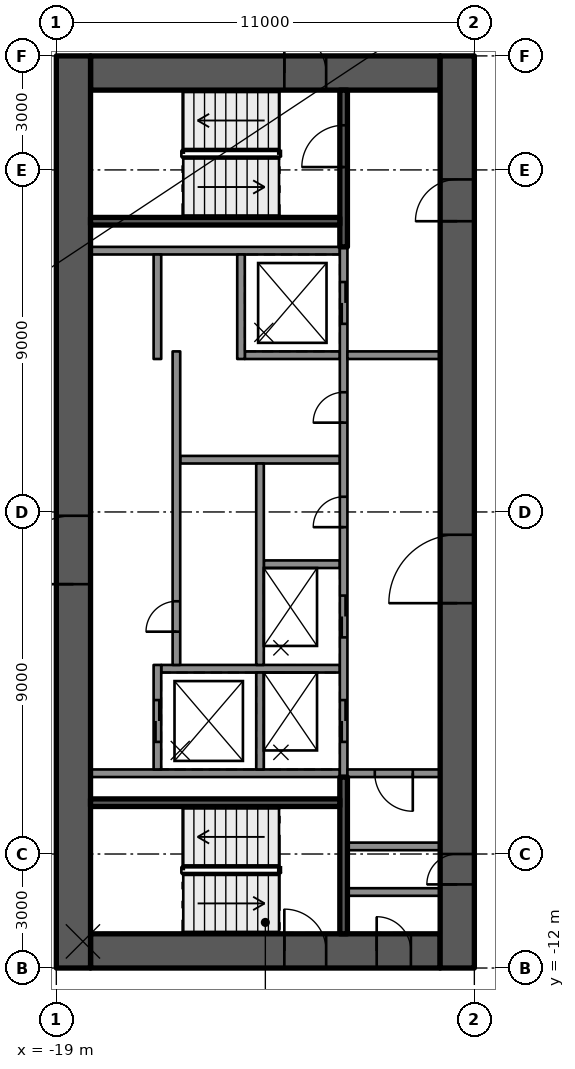
"""IFC4 building model, lengths in metres.
Left out: names, types, materials, properties, quantities, classifications, styles, units other than length and angle.
Written with IfcOpenShell. Run it as: python <this file> out.ifc"""

import sys

from ifc_helpers import new_model, si_unit, direction, frame, frame_2d, origin, place, context, subcontext, project, spatial, rectangle, extrude, element, fill, save


model = new_model("IFC4")
c1 = context("Model", 3, precision=1e-05, world=origin(), true_north=direction((0.0, 1.0)))
c2 = subcontext(c1, "Body", "Model", "MODEL_VIEW")
j1 = project(units=[si_unit("LENGTHUNIT", "METRE"), si_unit("PLANEANGLEUNIT", "RADIAN")], contexts=[c1])
p1 = place(None, origin())
s1 = spatial("IfcSite", under=j1, at=p1, CompositionType="ELEMENT")
p2 = place(p1, origin())
s2 = spatial("IfcBuilding", under=s1, at=p2, CompositionType="ELEMENT")
p3 = place(p2, frame((0.0, 0.0, 214.0)))
s3 = spatial("IfcBuildingStorey", under=s2, at=p3, CompositionType="ELEMENT", Elevation=214.0)
p4 = place(p3, frame((-18.1, 11.55, 0.0), z_axis=(0.0, 0.0, 1.0), x_axis=(1.0, 0.0, 0.0)))
e1 = element("IfcWall", 1, at=p4, inside=s3, PredefinedType="SHEAR", context=c2, shape_type="SweptSolid", body=[
    extrude(rectangle(XDim=9.2, YDim=0.9, at=frame_2d((4.6, 0.0))), origin(), (0.0, 0.0, 1.0), 3.5),
])
p5 = place(p4, frame((5.1, 0.0, 0.0)))
e2 = element("IfcOpeningElement", 2, at=p5, cuts=e1, PredefinedType="OPENING", context=c2, shape_type="SweptSolid", body=[
    extrude(rectangle(XDim=1.1, YDim=2.1, at=frame_2d((0.55, 1.05))), frame((0.0, 0.46, 0.0), z_axis=(0.0, -1.0, 0.0), x_axis=(1.0, 0.0, 0.0)), (0.0, 0.0, 1.0), 0.92),
])
p6 = place(p3, frame((-18.1, -11.55, 0.0), z_axis=(0.0, 0.0, 1.0), x_axis=(1.0, 0.0, 0.0)))
e3 = element("IfcWall", 3, at=p6, inside=s3, PredefinedType="SHEAR", context=c2, shape_type="SweptSolid", body=[
    extrude(rectangle(XDim=9.2, YDim=0.9, at=frame_2d((4.6, 0.0))), origin(), (0.0, 0.0, 1.0), 3.5),
])
p7 = place(p6, frame((5.1, 0.0, 0.0)))
e4 = element("IfcOpeningElement", 4, at=p7, cuts=e3, PredefinedType="OPENING", context=c2, shape_type="SweptSolid", body=[
    extrude(rectangle(XDim=1.1, YDim=2.1, at=frame_2d((0.55, 1.05))), frame((0.0, 0.46, 0.0), z_axis=(0.0, -1.0, 0.0), x_axis=(1.0, 0.0, 0.0)), (0.0, 0.0, 1.0), 0.92),
])
p8 = place(p6, frame((7.53, 0.0, 0.0)))
e5 = element("IfcOpeningElement", 5, at=p8, cuts=e3, PredefinedType="OPENING", context=c2, shape_type="SweptSolid", body=[
    extrude(rectangle(XDim=0.9, YDim=2.1, at=frame_2d((0.45, 1.05))), frame((0.0, 0.46, 0.0), z_axis=(0.0, -1.0, 0.0), x_axis=(1.0, 0.0, 0.0)), (0.0, 0.0, 1.0), 0.92),
])
p9 = place(p3, frame((-18.55, -12.0, 0.0), z_axis=(0.0, 0.0, 1.0), x_axis=(0.0, 1.0, 0.0)))
e6 = element("IfcWall", 6, at=p9, inside=s3, PredefinedType="SHEAR", context=c2, shape_type="SweptSolid", body=[
    extrude(rectangle(XDim=24.0, YDim=0.9, at=frame_2d((12.0, 0.0))), origin(), (0.0, 0.0, 1.0), 3.5),
])
p10 = place(p9, frame((10.1, 0.0, 0.0)))
e7 = element("IfcOpeningElement", 7, at=p10, cuts=e6, PredefinedType="OPENING", context=c2, shape_type="SweptSolid", body=[
    extrude(rectangle(XDim=1.8, YDim=2.1, at=frame_2d((0.9, 1.05))), frame((0.0, 0.46, 0.0), z_axis=(0.0, -1.0, 0.0), x_axis=(1.0, 0.0, 0.0)), (0.0, 0.0, 1.0), 0.92),
])
p11 = place(p3, frame((-8.45, -12.0, 0.0), z_axis=(0.0, 0.0, 1.0), x_axis=(0.0, 1.0, 0.0)))
e8 = element("IfcWall", 8, at=p11, inside=s3, PredefinedType="SHEAR", context=c2, shape_type="SweptSolid", body=[
    extrude(rectangle(XDim=24.0, YDim=0.9, at=frame_2d((12.0, 0.0))), origin(), (0.0, 0.0, 1.0), 3.5),
])
p12 = place(p11, frame((9.6, 0.0, 0.0)))
e9 = element("IfcOpeningElement", 9, at=p12, cuts=e8, PredefinedType="OPENING", context=c2, shape_type="SweptSolid", body=[
    extrude(rectangle(XDim=1.8, YDim=2.1, at=frame_2d((0.9, 1.05))), frame((0.0, 0.46, 0.0), z_axis=(0.0, -1.0, 0.0), x_axis=(1.0, 0.0, 0.0)), (0.0, 0.0, 1.0), 0.92),
])
p13 = place(p11, frame((19.65, 0.0, 0.0)))
e10 = element("IfcOpeningElement", 10, at=p13, cuts=e8, PredefinedType="OPENING", context=c2, shape_type="SweptSolid", body=[
    extrude(rectangle(XDim=1.1, YDim=2.1, at=frame_2d((0.55, 1.05))), frame((0.0, 0.46, 0.0), z_axis=(0.0, -1.0, 0.0), x_axis=(1.0, 0.0, 0.0)), (0.0, 0.0, 1.0), 0.92),
])
p14 = place(p11, frame((2.2, 0.0, 0.0)))
e11 = element("IfcOpeningElement", 11, at=p14, cuts=e8, PredefinedType="OPENING", context=c2, shape_type="SweptSolid", body=[
    extrude(rectangle(XDim=0.8, YDim=2.1, at=frame_2d((0.4, 1.05))), frame((0.0, 0.46, 0.0), z_axis=(0.0, -1.0, 0.0), x_axis=(1.0, 0.0, 0.0)), (0.0, 0.0, 1.0), 0.92),
])
for number, where, z_axis, x_axis in (
    (12, (-11.54, 6.875, 0.0), (0.0, 0.0, 1.0), (-1.0, 0.0, 0.0)),
    (13, (-11.54, -6.875, 0.0), (0.0, 0.0, 1.0), (-1.0, 0.0, 0.0)),
):
    element("IfcWall", number, at=place(p3, frame(where, z_axis=z_axis, x_axis=x_axis)), inside=s3, PredefinedType="SOLIDWALL", context=c2, shape_type="SweptSolid", body=[
        extrude(rectangle(XDim=6.56, YDim=0.2, at=frame_2d((3.28, 0.0))), origin(), (0.0, 0.0, 1.0), 3.08),
    ])
p15 = place(p3, frame((-11.54, -4.125, 0.0), z_axis=(0.0, 0.0, 1.0), x_axis=(-1.0, 0.0, 0.0)))
e14 = element("IfcWall", 14, at=p15, inside=s3, PredefinedType="SOLIDWALL", context=c2, shape_type="SweptSolid", body=[
    extrude(rectangle(XDim=4.7, YDim=0.2, at=frame_2d((2.35, 0.0))), origin(), (0.0, 0.0, 1.0), 3.08),
])
p16 = place(p3, frame((-11.54, -1.375, 0.0), z_axis=(0.0, 0.0, 1.0), x_axis=(-1.0, 0.0, 0.0)))
e15 = element("IfcWall", 15, at=p16, inside=s3, PredefinedType="SOLIDWALL", context=c2, shape_type="SweptSolid", body=[
    extrude(rectangle(XDim=2.0, YDim=0.2, at=frame_2d((1.0, 0.0))), origin(), (0.0, 0.0, 1.0), 3.08),
])
p17 = place(p3, frame((-11.54, 1.375, 0.0), z_axis=(0.0, 0.0, 1.0), x_axis=(-1.0, 0.0, 0.0)))
e16 = element("IfcWall", 16, at=p17, inside=s3, PredefinedType="SOLIDWALL", context=c2, shape_type="SweptSolid", body=[
    extrude(rectangle(XDim=4.2, YDim=0.2, at=frame_2d((2.1, 0.0))), origin(), (0.0, 0.0, 1.0), 3.08),
])
p18 = place(p3, frame((-11.54, 4.125, 0.0), z_axis=(0.0, 0.0, 1.0), x_axis=(-1.0, 0.0, 0.0)))
e17 = element("IfcWall", 17, at=p18, inside=s3, PredefinedType="SOLIDWALL", context=c2, shape_type="SweptSolid", body=[
    extrude(rectangle(XDim=2.5, YDim=0.2, at=frame_2d((1.25, 0.0))), origin(), (0.0, 0.0, 1.0), 3.08),
])
p19 = place(p3, frame((-11.44, -6.975, 0.0), z_axis=(0.0, 0.0, 1.0), x_axis=(0.0, 1.0, 0.0)))
e18 = element("IfcWall", 18, at=p19, inside=s3, PredefinedType="SOLIDWALL", context=c2, shape_type="SweptSolid", body=[
    extrude(rectangle(XDim=13.95, YDim=0.2, at=frame_2d((6.975, 0.0))), origin(), (0.0, 0.0, 1.0), 3.08),
])
p20 = place(p19, frame((0.925, 0.0, 0.0)))
e19 = element("IfcOpeningElement", 19, at=p20, cuts=e18, PredefinedType="OPENING", context=c2, shape_type="SweptSolid", body=[
    extrude(rectangle(XDim=1.1, YDim=2.1, at=frame_2d((0.55, 1.05))), frame((0.0, 0.11, 0.0), z_axis=(0.0, -1.0, 0.0), x_axis=(1.0, 0.0, 0.0)), (0.0, 0.0, 1.0), 0.22),
])
p21 = place(p19, frame((3.675, 0.0, 0.0)))
e20 = element("IfcOpeningElement", 20, at=p21, cuts=e18, PredefinedType="OPENING", context=c2, shape_type="SweptSolid", body=[
    extrude(rectangle(XDim=1.1, YDim=2.1, at=frame_2d((0.55, 1.05))), frame((0.0, 0.11, 0.0), z_axis=(0.0, -1.0, 0.0), x_axis=(1.0, 0.0, 0.0)), (0.0, 0.0, 1.0), 0.22),
])
p22 = place(p19, frame((11.925, 0.0, 0.0)))
e21 = element("IfcOpeningElement", 21, at=p22, cuts=e18, PredefinedType="OPENING", context=c2, shape_type="SweptSolid", body=[
    extrude(rectangle(XDim=1.1, YDim=2.1, at=frame_2d((0.55, 1.05))), frame((0.0, 0.11, 0.0), z_axis=(0.0, -1.0, 0.0), x_axis=(1.0, 0.0, 0.0)), (0.0, 0.0, 1.0), 0.22),
])
p23 = place(p19, frame((6.575, 0.0, 0.0)))
e22 = element("IfcOpeningElement", 22, at=p23, cuts=e18, PredefinedType="OPENING", context=c2, shape_type="SweptSolid", body=[
    extrude(rectangle(XDim=0.8, YDim=2.1, at=frame_2d((0.4, 1.05))), frame((0.0, 0.11, 0.0), z_axis=(0.0, -1.0, 0.0), x_axis=(1.0, 0.0, 0.0)), (0.0, 0.0, 1.0), 0.22),
])
p24 = place(p19, frame((9.325, 0.0, 0.0)))
e23 = element("IfcOpeningElement", 23, at=p24, cuts=e18, PredefinedType="OPENING", context=c2, shape_type="SweptSolid", body=[
    extrude(rectangle(XDim=0.8, YDim=2.1, at=frame_2d((0.4, 1.05))), frame((0.0, 0.11, 0.0), z_axis=(0.0, -1.0, 0.0), x_axis=(1.0, 0.0, 0.0)), (0.0, 0.0, 1.0), 0.22),
])
p25 = place(p3, frame((-13.64, -6.775, 0.0), z_axis=(0.0, 0.0, 1.0), x_axis=(0.0, 1.0, 0.0)))
e24 = element("IfcWall", 24, at=p25, inside=s3, PredefinedType="SOLIDWALL", context=c2, shape_type="SweptSolid", body=[
    extrude(rectangle(XDim=2.55, YDim=0.2, at=frame_2d((1.275, 0.0))), origin(), (0.0, 0.0, 1.0), 3.08),
])
p26 = place(p3, frame((-13.64, -4.025, 0.0), z_axis=(0.0, 0.0, 1.0), x_axis=(0.0, 1.0, 0.0)))
e25 = element("IfcWall", 25, at=p26, inside=s3, PredefinedType="SOLIDWALL", context=c2, shape_type="SweptSolid", body=[
    extrude(rectangle(XDim=5.3, YDim=0.2, at=frame_2d((2.65, 0.0))), origin(), (0.0, 0.0, 1.0), 3.08),
])
p27 = place(p3, frame((-14.14, 4.025, 0.0), z_axis=(0.0, 0.0, 1.0), x_axis=(0.0, 1.0, 0.0)))
e26 = element("IfcWall", 26, at=p27, inside=s3, PredefinedType="SOLIDWALL", context=c2, shape_type="SweptSolid", body=[
    extrude(rectangle(XDim=2.75, YDim=0.2, at=frame_2d((1.375, 0.0))), origin(), (0.0, 0.0, 1.0), 3.08),
])
p28 = place(p3, frame((-16.34, -6.775, 0.0), z_axis=(0.0, 0.0, 1.0), x_axis=(0.0, 1.0, 0.0)))
e27 = element("IfcWall", 27, at=p28, inside=s3, PredefinedType="SOLIDWALL", context=c2, shape_type="SweptSolid", body=[
    extrude(rectangle(XDim=2.75, YDim=0.2, at=frame_2d((1.375, 0.0))), origin(), (0.0, 0.0, 1.0), 3.08),
])
p29 = place(p28, frame((0.725, 0.0, 0.0)))
e28 = element("IfcOpeningElement", 28, at=p29, cuts=e27, PredefinedType="OPENING", context=c2, shape_type="SweptSolid", body=[
    extrude(rectangle(XDim=1.1, YDim=2.1, at=frame_2d((0.55, 1.05))), frame((0.0, 0.11, 0.0), z_axis=(0.0, -1.0, 0.0), x_axis=(1.0, 0.0, 0.0)), (0.0, 0.0, 1.0), 0.22),
])
p30 = place(p3, frame((-15.84, -4.025, 0.0), z_axis=(0.0, 0.0, 1.0), x_axis=(0.0, 1.0, 0.0)))
e29 = element("IfcWall", 29, at=p30, inside=s3, PredefinedType="SOLIDWALL", context=c2, shape_type="SweptSolid", body=[
    extrude(rectangle(XDim=8.25, YDim=0.2, at=frame_2d((4.125, 0.0))), origin(), (0.0, 0.0, 1.0), 3.08),
])
p31 = place(p30, frame((0.875, 0.0, 0.0)))
e30 = element("IfcOpeningElement", 30, at=p31, cuts=e29, PredefinedType="OPENING", context=c2, shape_type="SweptSolid", body=[
    extrude(rectangle(XDim=0.8, YDim=2.1, at=frame_2d((0.4, 1.05))), frame((0.0, 0.11, 0.0), z_axis=(0.0, -1.0, 0.0), x_axis=(1.0, 0.0, 0.0)), (0.0, 0.0, 1.0), 0.22),
])
p32 = place(p3, frame((-16.34, 4.025, 0.0), z_axis=(0.0, 0.0, 1.0), x_axis=(0.0, 1.0, 0.0)))
e31 = element("IfcWall", 31, at=p32, inside=s3, PredefinedType="SOLIDWALL", context=c2, shape_type="SweptSolid", body=[
    extrude(rectangle(XDim=2.75, YDim=0.2, at=frame_2d((1.375, 0.0))), origin(), (0.0, 0.0, 1.0), 3.08),
])
p33 = place(p3, frame((-11.44, 6.975, 0.0), z_axis=(0.0, 0.0, 1.0), x_axis=(0.0, 1.0, 0.0)))
e32 = element("IfcWall", 32, at=p33, inside=s3, PredefinedType="SOLIDWALL", context=c2, shape_type="SweptSolid", body=[
    extrude(rectangle(XDim=4.125, YDim=0.2, at=frame_2d((2.062, 0.0))), origin(), (0.0, 0.0, 1.0), 3.08),
])
p34 = place(p33, frame((2.1, 0.0, 0.0)))
e33 = element("IfcOpeningElement", 33, at=p34, cuts=e32, PredefinedType="OPENING", context=c2, shape_type="SweptSolid", body=[
    extrude(rectangle(XDim=1.1, YDim=2.1, at=frame_2d((0.55, 1.05))), frame((0.0, 0.11, 0.0), z_axis=(0.0, -1.0, 0.0), x_axis=(1.0, 0.0, 0.0)), (0.0, 0.0, 1.0), 0.22),
])
p35 = place(p3, frame((-11.54, 7.65, 0.0), z_axis=(0.0, 0.0, 1.0), x_axis=(-1.0, 0.0, 0.0)))
e34 = element("IfcWall", 34, at=p35, inside=s3, PredefinedType="SOLIDWALL", context=c2, shape_type="SweptSolid", body=[
    extrude(rectangle(XDim=6.56, YDim=0.2, at=frame_2d((3.28, 0.0))), origin(), (0.0, 0.0, 1.0), 3.08),
])
p36 = place(p3, frame((-11.44, -11.1, 0.0), z_axis=(0.0, 0.0, 1.0), x_axis=(0.0, 1.0, 0.0)))
e35 = element("IfcWall", 35, at=p36, inside=s3, PredefinedType="SOLIDWALL", context=c2, shape_type="SweptSolid", body=[
    extrude(rectangle(XDim=4.125, YDim=0.2, at=frame_2d((2.062, 0.0))), origin(), (0.0, 0.0, 1.0), 3.08),
])
p37 = place(p3, frame((-11.54, -7.65, 0.0), z_axis=(0.0, 0.0, 1.0), x_axis=(-1.0, 0.0, 0.0)))
e36 = element("IfcWall", 36, at=p37, inside=s3, PredefinedType="SOLIDWALL", context=c2, shape_type="SweptSolid", body=[
    extrude(rectangle(XDim=6.56, YDim=0.2, at=frame_2d((3.28, 0.0))), origin(), (0.0, 0.0, 1.0), 3.08),
])
p38 = place(p3, frame((-8.9, 4.125, 0.0), z_axis=(0.0, 0.0, 1.0), x_axis=(-1.0, 0.0, 0.0)))
e37 = element("IfcWall", 37, at=p38, inside=s3, PredefinedType="PARTITIONING", context=c2, shape_type="SweptSolid", body=[
    extrude(rectangle(XDim=2.44, YDim=0.2, at=frame_2d((1.22, 0.0))), origin(), (0.0, 0.0, 1.0), 3.08),
])
p39 = place(p3, frame((-8.9, -6.875, 0.0), z_axis=(0.0, 0.0, 1.0), x_axis=(-1.0, 0.0, 0.0)))
e38 = element("IfcWall", 38, at=p39, inside=s3, PredefinedType="PARTITIONING", context=c2, shape_type="SweptSolid", body=[
    extrude(rectangle(XDim=2.44, YDim=0.2, at=frame_2d((1.22, 0.0))), origin(), (0.0, 0.0, 1.0), 3.08),
])
p40 = place(p39, frame((0.72, 0.0, 0.0)))
e39 = element("IfcOpeningElement", 39, at=p40, cuts=e38, PredefinedType="OPENING", context=c2, shape_type="SweptSolid", body=[
    extrude(rectangle(XDim=1.0, YDim=2.1, at=frame_2d((0.5, 1.05))), frame((0.0, 0.11, 0.0), z_axis=(0.0, -1.0, 0.0), x_axis=(1.0, 0.0, 0.0)), (0.0, 0.0, 1.0), 0.22),
])
for number, where, z_axis, x_axis in (
    (40, (-8.9, -10.0, 0.0), (0.0, 0.0, 1.0), (-1.0, 0.0, 0.0)),
    (41, (-8.9, -8.8, 0.0), (0.0, 0.0, 1.0), (-1.0, 0.0, 0.0)),
):
    element("IfcWall", number, at=place(p3, frame(where, z_axis=z_axis, x_axis=x_axis)), inside=s3, PredefinedType="PARTITIONING", context=c2, shape_type="SweptSolid", body=[
        extrude(rectangle(XDim=2.44, YDim=0.2, at=frame_2d((1.22, 0.0))), origin(), (0.0, 0.0, 1.0), 3.08),
    ])
p41 = place(p20, origin())
e42 = element("IfcDoor", 42, at=p41, inside=s3, OperationType="DOUBLE_DOOR_SLIDING", PredefinedType="DOOR", context=c2, shape_type="SweptSolid", body=[
    extrude(rectangle(XDim=1.1, YDim=2.1, at=frame_2d((0.55, 1.05))), frame((0.0, 0.025, 0.0), z_axis=(0.0, -1.0, 0.0), x_axis=(1.0, 0.0, 0.0)), (0.0, 0.0, 1.0), 0.05),
])
fill(e19, e42)
p42 = place(p29, origin())
e43 = element("IfcDoor", 43, at=p42, inside=s3, OperationType="DOUBLE_DOOR_SLIDING", PredefinedType="DOOR", context=c2, shape_type="SweptSolid", body=[
    extrude(rectangle(XDim=1.1, YDim=2.1, at=frame_2d((0.55, 1.05))), frame((0.0, 0.025, 0.0), z_axis=(0.0, -1.0, 0.0), x_axis=(1.0, 0.0, 0.0)), (0.0, 0.0, 1.0), 0.05),
])
fill(e28, e43)
p43 = place(p21, origin())
e44 = element("IfcDoor", 44, at=p43, inside=s3, OperationType="DOUBLE_DOOR_SLIDING", PredefinedType="DOOR", context=c2, shape_type="SweptSolid", body=[
    extrude(rectangle(XDim=1.1, YDim=2.1, at=frame_2d((0.55, 1.05))), frame((0.0, 0.025, 0.0), z_axis=(0.0, -1.0, 0.0), x_axis=(1.0, 0.0, 0.0)), (0.0, 0.0, 1.0), 0.05),
])
fill(e20, e44)
p44 = place(p22, origin())
e45 = element("IfcDoor", 45, at=p44, inside=s3, OperationType="DOUBLE_DOOR_SLIDING", PredefinedType="DOOR", context=c2, shape_type="SweptSolid", body=[
    extrude(rectangle(XDim=1.1, YDim=2.1, at=frame_2d((0.55, 1.05))), frame((0.0, 0.025, 0.0), z_axis=(0.0, -1.0, 0.0), x_axis=(1.0, 0.0, 0.0)), (0.0, 0.0, 1.0), 0.05),
])
fill(e21, e45)
p45 = place(p31, origin())
e46 = element("IfcDoor", 46, at=p45, inside=s3, OperationType="SINGLE_SWING_LEFT", PredefinedType="DOOR", context=c2, shape_type="SweptSolid", body=[
    extrude(rectangle(XDim=0.8, YDim=2.1, at=frame_2d((0.4, 1.05))), frame((0.0, 0.025, 0.0), z_axis=(0.0, -1.0, 0.0), x_axis=(1.0, 0.0, 0.0)), (0.0, 0.0, 1.0), 0.05),
])
fill(e30, e46)
p46 = place(p23, origin())
e47 = element("IfcDoor", 47, at=p46, inside=s3, OperationType="SINGLE_SWING_LEFT", PredefinedType="DOOR", context=c2, shape_type="SweptSolid", body=[
    extrude(rectangle(XDim=0.8, YDim=2.1, at=frame_2d((0.4, 1.05))), frame((0.0, 0.025, 0.0), z_axis=(0.0, -1.0, 0.0), x_axis=(1.0, 0.0, 0.0)), (0.0, 0.0, 1.0), 0.05),
])
fill(e22, e47)
p47 = place(p24, origin())
e48 = element("IfcDoor", 48, at=p47, inside=s3, OperationType="SINGLE_SWING_LEFT", PredefinedType="DOOR", context=c2, shape_type="SweptSolid", body=[
    extrude(rectangle(XDim=0.8, YDim=2.1, at=frame_2d((0.4, 1.05))), frame((0.0, 0.025, 0.0), z_axis=(0.0, -1.0, 0.0), x_axis=(1.0, 0.0, 0.0)), (0.0, 0.0, 1.0), 0.05),
])
fill(e23, e48)
p48 = place(p12, origin())
e49 = element("IfcDoor", 49, at=p48, inside=s3, OperationType="SINGLE_SWING_LEFT", PredefinedType="DOOR", context=c2, shape_type="SweptSolid", body=[
    extrude(rectangle(XDim=1.8, YDim=2.1, at=frame_2d((0.9, 1.05))), frame((0.0, 0.025, 0.0), z_axis=(0.0, -1.0, 0.0), x_axis=(1.0, 0.0, 0.0)), (0.0, 0.0, 1.0), 0.05),
])
fill(e9, e49)
p49 = place(p10, origin())
e50 = element("IfcDoor", 50, at=p49, inside=s3, OperationType="SINGLE_SWING_LEFT", PredefinedType="DOOR", context=c2, shape_type="SweptSolid", body=[
    extrude(rectangle(XDim=1.8, YDim=2.1, at=frame_2d((0.9, 1.05))), frame((0.0, 0.025, 0.0), z_axis=(0.0, -1.0, 0.0), x_axis=(1.0, 0.0, 0.0)), (0.0, 0.0, 1.0), 0.05),
])
fill(e7, e50)
p50 = place(p13, origin())
e51 = element("IfcDoor", 51, at=p50, inside=s3, OperationType="SINGLE_SWING_RIGHT", PredefinedType="DOOR", context=c2, shape_type="SweptSolid", body=[
    extrude(rectangle(XDim=1.1, YDim=2.1, at=frame_2d((0.55, 1.05))), frame((0.0, 0.025, 0.0), z_axis=(0.0, -1.0, 0.0), x_axis=(1.0, 0.0, 0.0)), (0.0, 0.0, 1.0), 0.05),
])
fill(e10, e51)
p51 = place(p5, origin())
e52 = element("IfcDoor", 52, at=p51, inside=s3, OperationType="SINGLE_SWING_RIGHT", PredefinedType="DOOR", context=c2, shape_type="SweptSolid", body=[
    extrude(rectangle(XDim=1.1, YDim=2.1, at=frame_2d((0.55, 1.05))), frame((0.0, 0.025, 0.0), z_axis=(0.0, -1.0, 0.0), x_axis=(1.0, 0.0, 0.0)), (0.0, 0.0, 1.0), 0.05),
])
fill(e2, e52)
p52 = place(p7, origin())
e53 = element("IfcDoor", 53, at=p52, inside=s3, OperationType="SINGLE_SWING_RIGHT", PredefinedType="DOOR", context=c2, shape_type="SweptSolid", body=[
    extrude(rectangle(XDim=1.1, YDim=2.1, at=frame_2d((0.55, 1.05))), frame((0.0, 0.025, 0.0), z_axis=(0.0, -1.0, 0.0), x_axis=(1.0, 0.0, 0.0)), (0.0, 0.0, 1.0), 0.05),
])
fill(e4, e53)
p53 = place(p34, origin())
e54 = element("IfcDoor", 54, at=p53, inside=s3, OperationType="SINGLE_SWING_RIGHT", PredefinedType="DOOR", context=c2, shape_type="SweptSolid", body=[
    extrude(rectangle(XDim=1.1, YDim=2.1, at=frame_2d((0.55, 1.05))), frame((0.0, 0.025, 0.0), z_axis=(0.0, -1.0, 0.0), x_axis=(1.0, 0.0, 0.0)), (0.0, 0.0, 1.0), 0.05),
])
fill(e33, e54)
p54 = place(p8, origin())
e55 = element("IfcDoor", 55, at=p54, inside=s3, OperationType="SINGLE_SWING_RIGHT", PredefinedType="DOOR", context=c2, shape_type="SweptSolid", body=[
    extrude(rectangle(XDim=0.9, YDim=2.1, at=frame_2d((0.45, 1.05))), frame((0.0, 0.025, 0.0), z_axis=(0.0, -1.0, 0.0), x_axis=(1.0, 0.0, 0.0)), (0.0, 0.0, 1.0), 0.05),
])
fill(e5, e55)
p55 = place(p14, origin())
e56 = element("IfcDoor", 56, at=p55, inside=s3, OperationType="SINGLE_SWING_LEFT", PredefinedType="DOOR", context=c2, shape_type="SweptSolid", body=[
    extrude(rectangle(XDim=0.8, YDim=2.1, at=frame_2d((0.4, 1.05))), frame((0.0, 0.025, 0.0), z_axis=(0.0, -1.0, 0.0), x_axis=(1.0, 0.0, 0.0)), (0.0, 0.0, 1.0), 0.05),
])
fill(e11, e56)
p56 = place(p40, origin())
e57 = element("IfcDoor", 57, at=p56, inside=s3, OperationType="SINGLE_SWING_RIGHT", PredefinedType="DOOR", context=c2, shape_type="SweptSolid", body=[
    extrude(rectangle(XDim=1.0, YDim=2.1, at=frame_2d((0.5, 1.05))), frame((0.0, 0.025, 0.0), z_axis=(0.0, -1.0, 0.0), x_axis=(1.0, 0.0, 0.0)), (0.0, 0.0, 1.0), 0.05),
])
fill(e39, e57)
save(model, sys.argv[1])
